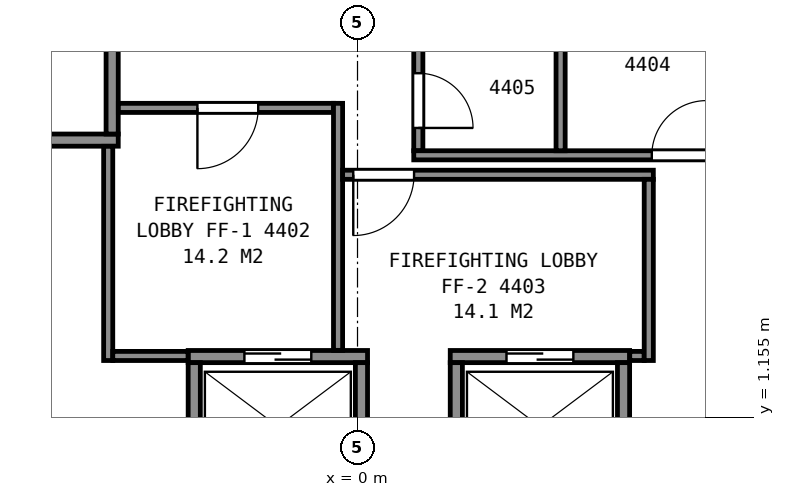
"""IFC4 building model, lengths in metres.
Left out: names, types, materials, properties, quantities, classifications, styles, units other than length and angle.
Written with IfcOpenShell. Run it as: python <this file> out.ifc"""

import sys

from ifc_helpers import new_model, si_unit, direction, frame, frame_2d, origin, place, context, subcontext, project, spatial, rectangle, extrude, element, fill, save


model = new_model("IFC4")
c1 = context("Model", 3, precision=1e-05, world=origin(), true_north=direction((0.0, 1.0)))
c2 = subcontext(c1, "Body", "Model", "MODEL_VIEW")
j1 = project(units=[si_unit("LENGTHUNIT", "METRE"), si_unit("PLANEANGLEUNIT", "RADIAN")], contexts=[c1])
p1 = place(None, origin())
s1 = spatial("IfcSite", under=j1, at=p1, CompositionType="ELEMENT")
p2 = place(p1, origin())
s2 = spatial("IfcBuilding", under=s1, at=p2, CompositionType="ELEMENT")
p3 = place(p2, frame((0.0, 0.0, 178.4)))
s3 = spatial("IfcBuildingStorey", under=s2, at=p3, CompositionType="ELEMENT", Elevation=178.4)
p4 = place(p3, frame((-2.785, 2.15, 0.0), z_axis=(0.0, 0.0, 1.0), x_axis=(1.0, 0.0, 0.0)))
e1 = element("IfcWall", 1, at=p4, inside=s3, PredefinedType="PARTITIONING", context=c2, shape_type="SweptSolid", body=[
    extrude(rectangle(XDim=2.95, YDim=0.2, at=frame_2d((1.475, 0.0))), origin(), (0.0, 0.0, 1.0), 3.7),
])
p5 = place(p4, frame((0.925, 0.0, 0.0)))
e2 = element("IfcOpeningElement", 2, at=p5, cuts=e1, PredefinedType="OPENING", context=c2, shape_type="SweptSolid", body=[
    extrude(rectangle(XDim=1.1, YDim=2.1, at=frame_2d((0.55, 1.05))), frame((0.0, 0.11, 0.0), z_axis=(0.0, -1.0, 0.0), x_axis=(1.0, 0.0, 0.0)), (0.0, 0.0, 1.0), 0.22),
])
p6 = place(p3, frame((1.525, 2.15, 0.0), z_axis=(0.0, 0.0, 1.0), x_axis=(1.0, 0.0, 0.0)))
e3 = element("IfcWall", 3, at=p6, inside=s3, PredefinedType="PARTITIONING", context=c2, shape_type="SweptSolid", body=[
    extrude(rectangle(XDim=2.95, YDim=0.2, at=frame_2d((1.475, 0.0))), origin(), (0.0, 0.0, 1.0), 3.7),
])
p7 = place(p6, frame((0.925, 0.0, 0.0)))
e4 = element("IfcOpeningElement", 4, at=p7, cuts=e3, PredefinedType="OPENING", context=c2, shape_type="SweptSolid", body=[
    extrude(rectangle(XDim=1.1, YDim=2.1, at=frame_2d((0.55, 1.05))), frame((0.0, 0.11, 0.0), z_axis=(0.0, -1.0, 0.0), x_axis=(1.0, 0.0, 0.0)), (0.0, 0.0, 1.0), 0.22),
])
p8 = place(p3, frame((-6.285, 5.71, 0.0), z_axis=(0.0, 0.0, 1.0), x_axis=(1.0, 0.0, 0.0)))
e5 = element("IfcWall", 5, at=p8, inside=s3, PredefinedType="PARTITIONING", context=c2, shape_type="SweptSolid", body=[
    extrude(rectangle(XDim=2.35, YDim=0.2, at=frame_2d((1.175, 0.0))), origin(), (0.0, 0.0, 1.0), 3.7),
])
p9 = place(p3, frame((5.663, -1.612, 0.0), z_axis=(0.0, 0.0, 1.0), x_axis=(0.49998122708, 0.866036242063, 0.0)))
e6 = element("IfcWall", 6, at=p9, inside=s3, PredefinedType="PARTITIONING", context=c2, shape_type="SweptSolid", body=[
    extrude(rectangle(XDim=4.9, YDim=0.2, at=frame_2d((2.45, 0.0))), origin(), (0.0, 0.0, 1.0), 3.7),
])
for number, where, z_axis, x_axis in (
    (7, (4.375, 0.1, 0.0), (0.0, 0.0, 1.0), (0.0, 1.0, 0.0)),
    (8, (1.625, 0.1, 0.0), (0.0, 0.0, 1.0), (0.0, 1.0, 0.0)),
    (9, (0.065, 0.1, 0.0), (0.0, 0.0, 1.0), (0.0, 1.0, 0.0)),
    (10, (-2.685, 0.1, 0.0), (0.0, 0.0, 1.0), (0.0, 1.0, 0.0)),
):
    element("IfcWall", number, at=place(p3, frame(where, z_axis=z_axis, x_axis=x_axis)), inside=s3, PredefinedType="PARTITIONING", context=c2, shape_type="SweptSolid", body=[
        extrude(rectangle(XDim=1.95, YDim=0.2, at=frame_2d((0.975, 0.0))), origin(), (0.0, 0.0, 1.0), 3.7),
    ])
p10 = place(p3, frame((-4.035, 5.81, 0.0), z_axis=(0.0, 0.0, 1.0), x_axis=(0.0, 1.0, 0.0)))
e11 = element("IfcWall", 11, at=p10, inside=s3, PredefinedType="PARTITIONING", context=c2, shape_type="SweptSolid", body=[
    extrude(rectangle(XDim=1.75, YDim=0.2, at=frame_2d((0.875, 0.0))), origin(), (0.0, 0.0, 1.0), 3.7),
])
p11 = place(p3, frame((-4.1, 2.085, 0.0), z_axis=(0.0, 0.0, 1.0), x_axis=(0.0, 1.0, 0.0)))
e12 = element("IfcWall", 12, at=p11, inside=s3, PredefinedType="PARTITIONING", context=c2, shape_type="SweptSolid", body=[
    extrude(rectangle(XDim=3.523, YDim=0.15, at=frame_2d((1.761, 0.0))), origin(), (0.0, 0.0, 1.0), 3.45),
])
p12 = place(p3, frame((-4.025, 2.16, 0.0), z_axis=(0.0, 0.0, 1.0), x_axis=(1.0, 0.0, 0.0)))
e13 = element("IfcWall", 13, at=p12, inside=s3, PredefinedType="PARTITIONING", context=c2, shape_type="SweptSolid", body=[
    extrude(rectangle(XDim=1.238, YDim=0.15, at=frame_2d((0.619, 0.0))), origin(), (0.0, 0.0, 1.0), 3.45),
])
p13 = place(p3, frame((-3.933, 6.24, 0.0), z_axis=(0.0, 0.0, 1.0), x_axis=(1.0, 0.0, 0.0)))
e14 = element("IfcWall", 14, at=p13, inside=s3, PredefinedType="PARTITIONING", context=c2, shape_type="SweptSolid", body=[
    extrude(rectangle(XDim=3.538, YDim=0.15, at=frame_2d((1.769, 0.0))), origin(), (0.0, 0.0, 1.0), 3.45),
])
p14 = place(p13, frame((1.3, 0.0, 0.0)))
e15 = element("IfcOpeningElement", 15, at=p14, cuts=e14, PredefinedType="OPENING", context=c2, shape_type="SweptSolid", body=[
    extrude(rectangle(XDim=1.0, YDim=2.1, at=frame_2d((0.5, 1.05))), frame((0.0, 0.085, 0.0), z_axis=(0.0, -1.0, 0.0), x_axis=(1.0, 0.0, 0.0)), (0.0, 0.0, 1.0), 0.17),
])
p15 = place(p3, frame((-0.32, 2.252, 0.0), z_axis=(0.0, 0.0, 1.0), x_axis=(0.0, 1.0, 0.0)))
e16 = element("IfcWall", 16, at=p15, inside=s3, PredefinedType="PARTITIONING", context=c2, shape_type="SweptSolid", body=[
    extrude(rectangle(XDim=4.063, YDim=0.15, at=frame_2d((2.031, 0.0))), origin(), (0.0, 0.0, 1.0), 3.45),
])
p16 = place(p3, frame((-0.245, 5.14, 0.0), z_axis=(0.0, 0.0, 1.0), x_axis=(1.0, 0.0, 0.0)))
e17 = element("IfcWall", 17, at=p16, inside=s3, PredefinedType="PARTITIONING", context=c2, shape_type="SweptSolid", body=[
    extrude(rectangle(XDim=5.11, YDim=0.15, at=frame_2d((2.555, 0.0))), origin(), (0.0, 0.0, 1.0), 3.45),
])
p17 = place(p16, frame((0.175, 0.0, 0.0)))
e18 = element("IfcOpeningElement", 18, at=p17, cuts=e17, PredefinedType="OPENING", context=c2, shape_type="SweptSolid", body=[
    extrude(rectangle(XDim=1.0, YDim=2.1, at=frame_2d((0.5, 1.05))), frame((0.0, 0.085, 0.0), z_axis=(0.0, -1.0, 0.0), x_axis=(1.0, 0.0, 0.0)), (0.0, 0.0, 1.0), 0.17),
])
p18 = place(p3, frame((1.0, 7.56, 0.0), z_axis=(0.0, 0.0, 1.0), x_axis=(0.0, -1.0, 0.0)))
e19 = element("IfcWall", 19, at=p18, inside=s3, PredefinedType="PARTITIONING", context=c2, shape_type="SweptSolid", body=[
    extrude(rectangle(XDim=2.025, YDim=0.15, at=frame_2d((1.013, 0.0))), origin(), (0.0, 0.0, 1.0), 3.45),
])
p19 = place(p18, frame((0.75, 0.0, 0.0)))
e20 = element("IfcOpeningElement", 20, at=p19, cuts=e19, PredefinedType="OPENING", context=c2, shape_type="SweptSolid", body=[
    extrude(rectangle(XDim=0.9, YDim=2.1, at=frame_2d((0.45, 1.05))), frame((0.0, 0.085, 0.0), z_axis=(0.0, -1.0, 0.0), x_axis=(1.0, 0.0, 0.0)), (0.0, 0.0, 1.0), 0.17),
])
p20 = place(p3, frame((0.925, 5.46, 0.0), z_axis=(0.0, 0.0, 1.0), x_axis=(1.0, 0.0, 0.0)))
e21 = element("IfcWall", 21, at=p20, inside=s3, PredefinedType="PARTITIONING", context=c2, shape_type="SweptSolid", body=[
    extrude(rectangle(XDim=5.22, YDim=0.15, at=frame_2d((2.61, 0.0))), origin(), (0.0, 0.0, 1.0), 3.45),
])
p21 = place(p20, frame((3.915, 0.0, 0.0)))
e22 = element("IfcOpeningElement", 22, at=p21, cuts=e21, PredefinedType="OPENING", context=c2, shape_type="SweptSolid", body=[
    extrude(rectangle(XDim=0.9, YDim=2.1, at=frame_2d((0.45, 1.05))), frame((0.0, 0.085, 0.0), z_axis=(0.0, -1.0, 0.0), x_axis=(1.0, 0.0, 0.0)), (0.0, 0.0, 1.0), 0.17),
])
p22 = place(p3, frame((3.34, 5.535, 0.0), z_axis=(0.0, 0.0, 1.0), x_axis=(0.0, 1.0, 0.0)))
e23 = element("IfcWall", 23, at=p22, inside=s3, PredefinedType="PARTITIONING", context=c2, shape_type="SweptSolid", body=[
    extrude(rectangle(XDim=2.025, YDim=0.15, at=frame_2d((1.013, 0.0))), origin(), (0.0, 0.0, 1.0), 3.45),
])
p23 = place(p3, frame((4.477, 2.16, 0.0), z_axis=(0.0, 0.0, 1.0), x_axis=(1.0, 0.0, 0.0)))
e24 = element("IfcWall", 24, at=p23, inside=s3, PredefinedType="PARTITIONING", context=c2, shape_type="SweptSolid", body=[
    extrude(rectangle(XDim=0.238, YDim=0.15, at=frame_2d((0.119, 0.0))), origin(), (0.0, 0.0, 1.0), 3.45),
])
p24 = place(p3, frame((4.79, 2.085, 0.0), z_axis=(0.0, 0.0, 1.0), x_axis=(0.0, 1.0, 0.0)))
e25 = element("IfcWall", 25, at=p24, inside=s3, PredefinedType="PARTITIONING", context=c2, shape_type="SweptSolid", body=[
    extrude(rectangle(XDim=2.98, YDim=0.15, at=frame_2d((1.49, 0.0))), origin(), (0.0, 0.0, 1.0), 3.45),
])
p25 = place(p3, frame((-4.075, -12.545, 0.0), z_axis=(0.0, 0.0, 1.0), x_axis=(-0.499997769292, 0.86602669168, 0.0)))
e26 = element("IfcWall", 26, at=p25, inside=s3, PredefinedType="PARTITIONING", context=c2, shape_type="SweptSolid", body=[
    extrude(rectangle(XDim=17.706, YDim=0.2, at=frame_2d((8.853, 0.0))), origin(), (0.0, 0.0, 1.0), 2.713),
])
p26 = place(p25, frame((14.46, 0.0, 0.0)))
e27 = element("IfcOpeningElement", 27, at=p26, cuts=e26, PredefinedType="OPENING", context=c2, shape_type="SweptSolid", body=[
    extrude(rectangle(XDim=0.9, YDim=2.1, at=frame_2d((0.45, 1.05))), frame((0.0, 0.11, 0.0), z_axis=(0.0, -1.0, 0.0), x_axis=(1.0, 0.0, 0.0)), (0.0, 0.0, 1.0), 0.22),
])
p27 = place(p25, frame((10.896, 0.0, 0.0)))
e28 = element("IfcOpeningElement", 28, at=p27, cuts=e26, PredefinedType="OPENING", context=c2, shape_type="SweptSolid", body=[
    extrude(rectangle(XDim=0.9, YDim=2.1, at=frame_2d((0.45, 1.05))), frame((0.0, 0.11, 0.0), z_axis=(0.0, -1.0, 0.0), x_axis=(1.0, 0.0, 0.0)), (0.0, 0.0, 1.0), 0.22),
])
p28 = place(p25, frame((6.068, 0.0, 0.0)))
e29 = element("IfcOpeningElement", 29, at=p28, cuts=e26, PredefinedType="OPENING", context=c2, shape_type="SweptSolid", body=[
    extrude(rectangle(XDim=0.9, YDim=2.1, at=frame_2d((0.45, 1.05))), frame((0.0, 0.11, 0.0), z_axis=(0.0, -1.0, 0.0), x_axis=(1.0, 0.0, 0.0)), (0.0, 0.0, 1.0), 0.22),
])
p29 = place(p3, frame((12.903, 2.745, 0.0), z_axis=(0.0, 0.0, 1.0), x_axis=(-0.499997333799, -0.866026943111, 0.0)))
e30 = element("IfcWall", 30, at=p29, inside=s3, PredefinedType="PARTITIONING", context=c2, shape_type="SweptSolid", body=[
    extrude(rectangle(XDim=17.606, YDim=0.1, at=frame_2d((8.803, 0.0))), origin(), (0.0, 0.0, 1.0), 2.713),
])
p30 = place(p29, frame((15.756, 0.0, 0.0)))
e31 = element("IfcOpeningElement", 31, at=p30, cuts=e30, PredefinedType="OPENING", context=c2, shape_type="SweptSolid", body=[
    extrude(rectangle(XDim=0.9, YDim=2.1, at=frame_2d((0.45, 1.05))), frame((0.0, 0.06, 0.0), z_axis=(0.0, -1.0, 0.0), x_axis=(1.0, 0.0, 0.0)), (0.0, 0.0, 1.0), 0.12),
])
p31 = place(p29, frame((11.679, 0.0, 0.0)))
e32 = element("IfcOpeningElement", 32, at=p31, cuts=e30, PredefinedType="OPENING", context=c2, shape_type="SweptSolid", body=[
    extrude(rectangle(XDim=0.9, YDim=2.1, at=frame_2d((0.45, 1.05))), frame((0.0, 0.06, 0.0), z_axis=(0.0, -1.0, 0.0), x_axis=(1.0, 0.0, 0.0)), (0.0, 0.0, 1.0), 0.12),
])
p32 = place(p29, frame((6.324, 0.0, 0.0)))
e33 = element("IfcOpeningElement", 33, at=p32, cuts=e30, PredefinedType="OPENING", context=c2, shape_type="SweptSolid", body=[
    extrude(rectangle(XDim=0.9, YDim=2.1, at=frame_2d((0.45, 1.05))), frame((0.0, 0.06, 0.0), z_axis=(0.0, -1.0, 0.0), x_axis=(1.0, 0.0, 0.0)), (0.0, 0.0, 1.0), 0.12),
])
p33 = place(p5, origin())
e34 = element("IfcDoor", 34, at=p33, inside=s3, OperationType="SLIDING_TO_LEFT", PredefinedType="DOOR", context=c2, shape_type="SweptSolid", body=[
    extrude(rectangle(XDim=1.1, YDim=2.1, at=frame_2d((0.55, 1.05))), frame((0.0, 0.025, 0.0), z_axis=(0.0, -1.0, 0.0), x_axis=(1.0, 0.0, 0.0)), (0.0, 0.0, 1.0), 0.05),
])
fill(e2, e34)
p34 = place(p7, origin())
e35 = element("IfcDoor", 35, at=p34, inside=s3, OperationType="SLIDING_TO_RIGHT", PredefinedType="DOOR", context=c2, shape_type="SweptSolid", body=[
    extrude(rectangle(XDim=1.1, YDim=2.1, at=frame_2d((0.55, 1.05))), frame((0.0, 0.025, 0.0), z_axis=(0.0, -1.0, 0.0), x_axis=(1.0, 0.0, 0.0)), (0.0, 0.0, 1.0), 0.05),
])
fill(e4, e35)
p35 = place(p14, origin())
e36 = element("IfcDoor", 36, at=p35, inside=s3, OperationType="SINGLE_SWING_LEFT", PredefinedType="DOOR", context=c2, shape_type="SweptSolid", body=[
    extrude(rectangle(XDim=1.0, YDim=2.1, at=frame_2d((0.5, 1.05))), frame((0.0, 0.025, 0.0), z_axis=(0.0, -1.0, 0.0), x_axis=(1.0, 0.0, 0.0)), (0.0, 0.0, 1.0), 0.05),
])
fill(e15, e36)
p36 = place(p17, origin())
e37 = element("IfcDoor", 37, at=p36, inside=s3, OperationType="SINGLE_SWING_LEFT", PredefinedType="DOOR", context=c2, shape_type="SweptSolid", body=[
    extrude(rectangle(XDim=1.0, YDim=2.1, at=frame_2d((0.5, 1.05))), frame((0.0, 0.025, 0.0), z_axis=(0.0, -1.0, 0.0), x_axis=(1.0, 0.0, 0.0)), (0.0, 0.0, 1.0), 0.05),
])
fill(e18, e37)
p37 = place(p19, origin())
e38 = element("IfcDoor", 38, at=p37, inside=s3, OperationType="SINGLE_SWING_RIGHT", PredefinedType="DOOR", context=c2, shape_type="SweptSolid", body=[
    extrude(rectangle(XDim=0.9, YDim=2.1, at=frame_2d((0.45, 1.05))), frame((0.0, 0.025, 0.0), z_axis=(0.0, -1.0, 0.0), x_axis=(1.0, 0.0, 0.0)), (0.0, 0.0, 1.0), 0.05),
])
fill(e20, e38)
p38 = place(p21, origin())
e39 = element("IfcDoor", 39, at=p38, inside=s3, OperationType="SINGLE_SWING_RIGHT", PredefinedType="DOOR", context=c2, shape_type="SweptSolid", body=[
    extrude(rectangle(XDim=0.9, YDim=2.1, at=frame_2d((0.45, 1.05))), frame((0.0, 0.025, 0.0), z_axis=(0.0, -1.0, 0.0), x_axis=(1.0, 0.0, 0.0)), (0.0, 0.0, 1.0), 0.05),
])
fill(e22, e39)
save(model, sys.argv[1])
